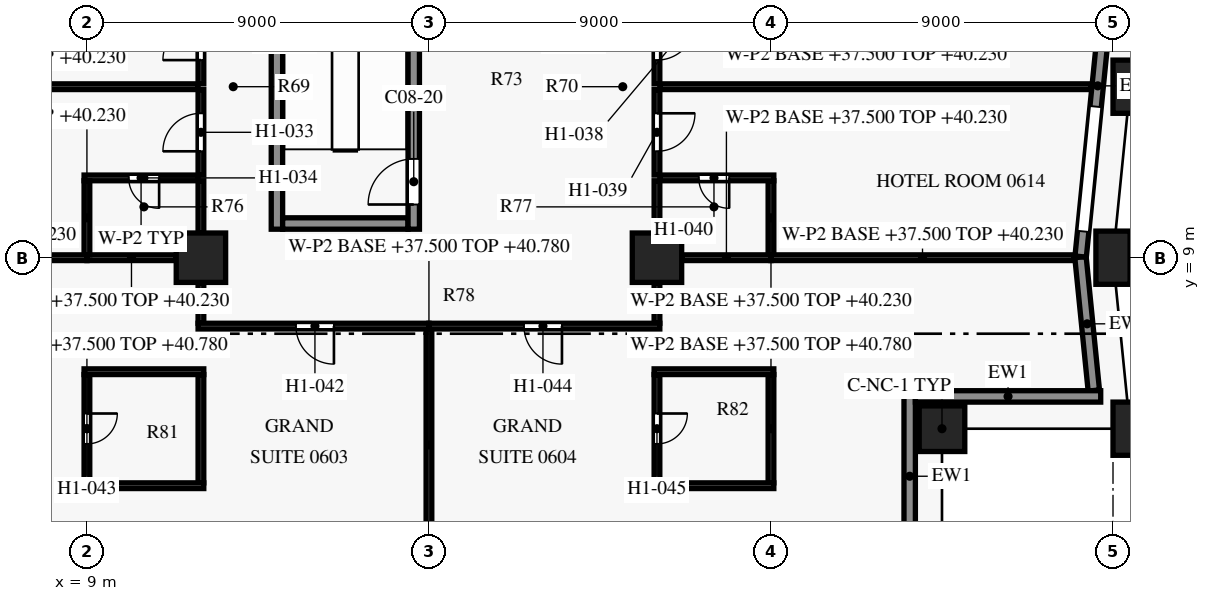
"""IFC4 building model, lengths in metres.
Left out: names, types, materials, properties, quantities, classifications, styles, units other than length and angle.
Written with IfcOpenShell. Run it as: python <this file> out.ifc"""

import sys

from ifc_helpers import new_model, si_unit, direction, frame, frame_2d, origin, origin_2d, place, context, subcontext, project, spatial, rectangle, extrude, element, fill, save


model = new_model("IFC4")
c1 = context("Model", 3, precision=1e-05, world=origin(), true_north=direction((0.0, 1.0)))
c2 = subcontext(c1, "Body", "Model", "MODEL_VIEW")
j1 = project(units=[si_unit("LENGTHUNIT", "METRE"), si_unit("PLANEANGLEUNIT", "RADIAN")], contexts=[c1])
p1 = place(None, origin())
s1 = spatial("IfcSite", under=j1, at=p1, CompositionType="ELEMENT")
p2 = place(p1, origin())
s2 = spatial("IfcBuilding", under=s1, at=p2, CompositionType="ELEMENT")
p3 = place(p2, frame((0.0, 0.0, 37.5)))
s3 = spatial("IfcBuildingStorey", under=s2, at=p3, CompositionType="ELEMENT", Elevation=37.5)
for number, where, z_axis, x_axis in (
    (1, (36.45, 4.5, 0.0), (0.0, 0.0, 1.0), (-0.1, 0.995, 0.0)),
    (2, (36.0, 9.0, 0.0), (0.0, 0.0, 1.0), (0.0, 1.0, 0.0)),
    (3, (36.45, 13.5, 0.0), (0.0, 0.0, 1.0), (0.1, 0.995, 0.0)),
):
    element("IfcColumn", number, at=place(p3, frame(where, z_axis=z_axis, x_axis=x_axis)), inside=s3, PredefinedType="COLUMN", context=c2, shape_type="SweptSolid", body=[
        extrude(rectangle(XDim=0.9, YDim=1.4, at=origin_2d()), origin(), (0.0, 0.0, 1.0), 3.6),
    ])
p4 = place(p3, frame((31.5, 4.5, 0.0), z_axis=(0.0, 0.0, 1.0), x_axis=(1.0, 0.0, 0.0)))
e4 = element("IfcColumn", 4, at=p4, inside=s3, PredefinedType="COLUMN", context=c2, shape_type="SweptSolid", body=[
    extrude(rectangle(XDim=1.2, YDim=1.2, at=origin_2d()), origin(), (0.0, 0.0, 1.0), 3.6),
])
for number, where, z_axis, x_axis in (
    (5, (12.0, 9.0, 0.0), (0.0, 0.0, 1.0), (1.0, 0.0, 0.0)),
    (6, (24.0, 9.0, 0.0), (0.0, 0.0, 1.0), (1.0, 0.0, 0.0)),
):
    element("IfcColumn", number, at=place(p3, frame(where, z_axis=z_axis, x_axis=x_axis)), inside=s3, PredefinedType="COLUMN", context=c2, shape_type="SweptSolid", body=[
        extrude(rectangle(XDim=1.3, YDim=1.3, at=origin_2d()), origin(), (0.0, 0.0, 1.0), 3.6),
    ])
p5 = place(p3, frame((30.65, 5.5, 0.0), z_axis=(0.0, 0.0, 1.0), x_axis=(0.0, -1.0, 0.0)))
e7 = element("IfcWall", 7, at=p5, inside=s3, PredefinedType="SOLIDWALL", context=c2, shape_type="SweptSolid", body=[
    extrude(rectangle(XDim=4.502, YDim=0.3, at=frame_2d((2.251, 0.0))), origin(), (0.0, 0.0, 1.0), 2.95),
])
p6 = place(p3, frame((35.677, 5.35, 0.0), z_axis=(0.0, 0.0, 1.0), x_axis=(-1.0, 0.0, 0.0)))
e8 = element("IfcWall", 8, at=p6, inside=s3, PredefinedType="SOLIDWALL", context=c2, shape_type="SweptSolid", body=[
    extrude(rectangle(XDim=4.876, YDim=0.3, at=frame_2d((2.438, 0.0))), origin(), (0.0, 0.0, 1.0), 2.95),
])
p7 = place(p3, frame((35.144, 9.015, 0.0), z_axis=(0.0, 0.0, 1.0), x_axis=(0.099462600847, -0.995041301169, 0.0)))
e9 = element("IfcWall", 9, at=p7, inside=s3, PredefinedType="SOLIDWALL", context=c2, shape_type="SweptSolid", body=[
    extrude(rectangle(XDim=3.527, YDim=0.3, at=frame_2d((1.764, 0.0))), origin(), (0.0, 0.0, 1.0), 2.95),
])
p8 = place(p3, frame((36.047, 18.015, 0.0), z_axis=(0.0, 0.0, 1.0), x_axis=(-0.099522457379, -0.995035316196, 0.0)))
e10 = element("IfcWall", 10, at=p8, inside=s3, PredefinedType="SOLIDWALL", context=c2, shape_type="SweptSolid", body=[
    extrude(rectangle(XDim=9.03, YDim=0.3, at=frame_2d((4.515, 0.0))), origin(), (0.0, 0.0, 1.0), 2.95),
])
p9 = place(p8, frame((1.291, 0.0, 0.75)))
e11 = element("IfcOpeningElement", 11, at=p9, cuts=e10, PredefinedType="OPENING", context=c2, shape_type="SweptSolid", body=[
    extrude(rectangle(XDim=1.8, YDim=1.8, at=frame_2d((0.9, 0.9))), frame((0.0, 0.16, 0.0), z_axis=(0.0, -1.0, 0.0), x_axis=(1.0, 0.0, 0.0)), (0.0, 0.0, 1.0), 0.32),
])
p10 = place(p8, frame((5.064, 0.0, 0.15)))
e12 = element("IfcOpeningElement", 12, at=p10, cuts=e10, PredefinedType="OPENING", context=c2, shape_type="SweptSolid", body=[
    extrude(rectangle(XDim=3.3, YDim=2.4, at=frame_2d((1.65, 1.2))), frame((0.0, 0.16, 0.0), z_axis=(0.0, -1.0, 0.0), x_axis=(1.0, 0.0, 0.0)), (0.0, 0.0, 1.0), 0.32),
])
p11 = place(p3, frame((14.15, 9.9, 0.0), z_axis=(0.0, 0.0, 1.0), x_axis=(1.0, 0.0, 0.0)))
e13 = element("IfcWall", 13, at=p11, inside=s3, PredefinedType="SHEAR", context=c2, shape_type="SweptSolid", body=[
    extrude(rectangle(XDim=3.3, YDim=0.3, at=frame_2d((1.65, 0.0))), origin(), (0.0, 0.0, 1.0), 3.3),
])
p12 = place(p3, frame((14.0, 9.75, 0.0), z_axis=(0.0, 0.0, 1.0), x_axis=(0.0, 1.0, 0.0)))
e14 = element("IfcWall", 14, at=p12, inside=s3, PredefinedType="SHEAR", context=c2, shape_type="SweptSolid", body=[
    extrude(rectangle(XDim=8.3, YDim=0.3, at=frame_2d((4.15, 0.0))), origin(), (0.0, 0.0, 1.0), 3.3),
])
p13 = place(p3, frame((17.6, 9.75, 0.0), z_axis=(0.0, 0.0, 1.0), x_axis=(0.0, 1.0, 0.0)))
e15 = element("IfcWall", 15, at=p13, inside=s3, PredefinedType="SHEAR", context=c2, shape_type="SweptSolid", body=[
    extrude(rectangle(XDim=8.3, YDim=0.3, at=frame_2d((4.15, 0.0))), origin(), (0.0, 0.0, 1.0), 3.3),
])
p14 = place(p13, frame((0.65, 0.0, 0.0)))
e16 = element("IfcOpeningElement", 16, at=p14, cuts=e15, PredefinedType="OPENING", context=c2, shape_type="SweptSolid", body=[
    extrude(rectangle(XDim=1.2, YDim=2.2, at=frame_2d((0.6, 1.1))), frame((0.0, 0.16, 0.0), z_axis=(0.0, -1.0, 0.0), x_axis=(1.0, 0.0, 0.0)), (0.0, 0.0, 1.0), 0.32),
])
for number, where, z_axis, x_axis in (
    (17, (8.925, 3.0, 0.0), (0.0, 0.0, 1.0), (1.0, 0.0, 0.0)),
    (18, (23.925, 3.0, 0.0), (0.0, 0.0, 1.0), (1.0, 0.0, 0.0)),
):
    element("IfcWall", number, at=place(p3, frame(where, z_axis=z_axis, x_axis=x_axis)), inside=s3, PredefinedType="PARTITIONING", context=c2, shape_type="SweptSolid", body=[
        extrude(rectangle(XDim=3.15, YDim=0.15, at=frame_2d((1.575, 0.0))), origin(), (0.0, 0.0, 1.0), 2.58),
    ])
p15 = place(p3, frame((12.0, 3.075, 0.0), z_axis=(0.0, 0.0, 1.0), x_axis=(0.0, 1.0, 0.0)))
e19 = element("IfcWall", 19, at=p15, inside=s3, PredefinedType="PARTITIONING", context=c2, shape_type="SweptSolid", body=[
    extrude(rectangle(XDim=2.85, YDim=0.15, at=frame_2d((1.425, 0.0))), origin(), (0.0, 0.0, 1.0), 2.58),
])
p16 = place(p3, frame((27.0, 3.075, 0.0), z_axis=(0.0, 0.0, 1.0), x_axis=(0.0, 1.0, 0.0)))
e20 = element("IfcWall", 20, at=p16, inside=s3, PredefinedType="PARTITIONING", context=c2, shape_type="SweptSolid", body=[
    extrude(rectangle(XDim=2.85, YDim=0.15, at=frame_2d((1.425, 0.0))), origin(), (0.0, 0.0, 1.0), 3.28),
])
p17 = place(p3, frame((9.0, 5.925, 0.0), z_axis=(0.0, 0.0, 1.0), x_axis=(0.0, -1.0, 0.0)))
e21 = element("IfcWall", 21, at=p17, inside=s3, PredefinedType="PARTITIONING", context=c2, shape_type="SweptSolid", body=[
    extrude(rectangle(XDim=2.85, YDim=0.15, at=frame_2d((1.425, 0.0))), origin(), (0.0, 0.0, 1.0), 3.28),
])
p18 = place(p17, frame((1.025, 0.0, 0.0)))
e22 = element("IfcOpeningElement", 22, at=p18, cuts=e21, PredefinedType="OPENING", context=c2, shape_type="SweptSolid", body=[
    extrude(rectangle(XDim=0.8, YDim=2.1, at=frame_2d((0.4, 1.05))), frame((0.0, 0.085, 0.0), z_axis=(0.0, -1.0, 0.0), x_axis=(1.0, 0.0, 0.0)), (0.0, 0.0, 1.0), 0.17),
])
p19 = place(p3, frame((24.0, 5.925, 0.0), z_axis=(0.0, 0.0, 1.0), x_axis=(0.0, -1.0, 0.0)))
e23 = element("IfcWall", 23, at=p19, inside=s3, PredefinedType="PARTITIONING", context=c2, shape_type="SweptSolid", body=[
    extrude(rectangle(XDim=2.85, YDim=0.15, at=frame_2d((1.425, 0.0))), origin(), (0.0, 0.0, 1.0), 2.58),
])
p20 = place(p19, frame((1.025, 0.0, 0.0)))
e24 = element("IfcOpeningElement", 24, at=p20, cuts=e23, PredefinedType="OPENING", context=c2, shape_type="SweptSolid", body=[
    extrude(rectangle(XDim=0.8, YDim=2.1, at=frame_2d((0.4, 1.05))), frame((0.0, 0.085, 0.0), z_axis=(0.0, -1.0, 0.0), x_axis=(1.0, 0.0, 0.0)), (0.0, 0.0, 1.0), 0.17),
])
for number, where, z_axis, x_axis in (
    (25, (12.075, 6.0, 0.0), (0.0, 0.0, 1.0), (-1.0, 0.0, 0.0)),
    (26, (27.075, 6.0, 0.0), (0.0, 0.0, 1.0), (-1.0, 0.0, 0.0)),
):
    element("IfcWall", number, at=place(p3, frame(where, z_axis=z_axis, x_axis=x_axis)), inside=s3, PredefinedType="PARTITIONING", context=c2, shape_type="SweptSolid", body=[
        extrude(rectangle(XDim=3.15, YDim=0.15, at=frame_2d((1.575, 0.0))), origin(), (0.0, 0.0, 1.0), 2.58),
    ])
p21 = place(p3, frame((18.0, 7.125, 0.0), z_axis=(0.0, 0.0, 1.0), x_axis=(0.0, -1.0, 0.0)))
e27 = element("IfcWall", 27, at=p21, inside=s3, PredefinedType="PARTITIONING", context=c2, shape_type="SweptSolid", body=[
    extrude(rectangle(XDim=6.105, YDim=0.15, at=frame_2d((3.052, 0.0))), origin(), (0.0, 0.0, 1.0), 3.28),
])
p22 = place(p3, frame((18.0, 7.2, 0.0), z_axis=(0.0, 0.0, 1.0), x_axis=(-1.0, 0.0, 0.0)))
e28 = element("IfcWall", 28, at=p22, inside=s3, PredefinedType="PARTITIONING", context=c2, shape_type="SweptSolid", body=[
    extrude(rectangle(XDim=6.075, YDim=0.15, at=frame_2d((3.038, 0.0))), origin(), (0.0, 0.0, 1.0), 2.58),
])
p23 = place(p22, frame((2.5, 0.0, 0.0)))
e29 = element("IfcOpeningElement", 29, at=p23, cuts=e28, PredefinedType="OPENING", context=c2, shape_type="SweptSolid", body=[
    extrude(rectangle(XDim=1.0, YDim=2.1, at=frame_2d((0.5, 1.05))), frame((0.0, 0.085, 0.0), z_axis=(0.0, -1.0, 0.0), x_axis=(1.0, 0.0, 0.0)), (0.0, 0.0, 1.0), 0.17),
])
p24 = place(p3, frame((24.075, 7.2, 0.0), z_axis=(0.0, 0.0, 1.0), x_axis=(-1.0, 0.0, 0.0)))
e30 = element("IfcWall", 30, at=p24, inside=s3, PredefinedType="PARTITIONING", context=c2, shape_type="SweptSolid", body=[
    extrude(rectangle(XDim=6.075, YDim=0.15, at=frame_2d((3.038, 0.0))), origin(), (0.0, 0.0, 1.0), 2.58),
])
p25 = place(p24, frame((2.575, 0.0, 0.0)))
e31 = element("IfcOpeningElement", 31, at=p25, cuts=e30, PredefinedType="OPENING", context=c2, shape_type="SweptSolid", body=[
    extrude(rectangle(XDim=1.0, YDim=2.1, at=frame_2d((0.5, 1.05))), frame((0.0, 0.085, 0.0), z_axis=(0.0, -1.0, 0.0), x_axis=(1.0, 0.0, 0.0)), (0.0, 0.0, 1.0), 0.17),
])
for number, where, z_axis, x_axis in (
    (32, (12.0, 7.275, 0.0), (0.0, 0.0, 1.0), (0.0, 1.0, 0.0)),
    (33, (24.0, 8.345, 0.0), (0.0, 0.0, 1.0), (0.0, -1.0, 0.0)),
):
    element("IfcWall", number, at=place(p3, frame(where, z_axis=z_axis, x_axis=x_axis)), inside=s3, PredefinedType="PARTITIONING", context=c2, shape_type="SweptSolid", body=[
        extrude(rectangle(XDim=1.07, YDim=0.15, at=frame_2d((0.535, 0.0))), origin(), (0.0, 0.0, 1.0), 2.58),
    ])
p26 = place(p3, frame((9.0, 9.0, 0.0), z_axis=(0.0, 0.0, 1.0), x_axis=(-1.0, 0.0, 0.0)))
e34 = element("IfcWall", 34, at=p26, inside=s3, PredefinedType="PARTITIONING", context=c2, shape_type="SweptSolid", body=[
    extrude(rectangle(XDim=7.975, YDim=0.15, at=frame_2d((3.988, 0.0))), origin(), (0.0, 0.0, 1.0), 2.73),
])
for number, where, z_axis, x_axis in (
    (35, (11.345, 9.0, 0.0), (0.0, 0.0, 1.0), (-1.0, 0.0, 0.0)),
    (36, (27.0, 9.0, 0.0), (0.0, 0.0, 1.0), (-1.0, 0.0, 0.0)),
):
    element("IfcWall", number, at=place(p3, frame(where, z_axis=z_axis, x_axis=x_axis)), inside=s3, PredefinedType="PARTITIONING", context=c2, shape_type="SweptSolid", body=[
        extrude(rectangle(XDim=2.345, YDim=0.15, at=frame_2d((1.172, 0.0))), origin(), (0.0, 0.0, 1.0), 2.73),
    ])
p27 = place(p3, frame((34.975, 9.0, 0.0), z_axis=(0.0, 0.0, 1.0), x_axis=(-1.0, 0.0, 0.0)))
e37 = element("IfcWall", 37, at=p27, inside=s3, PredefinedType="PARTITIONING", context=c2, shape_type="SweptSolid", body=[
    extrude(rectangle(XDim=7.975, YDim=0.15, at=frame_2d((3.988, 0.0))), origin(), (0.0, 0.0, 1.0), 2.73),
])
p28 = place(p3, frame((27.0, 9.075, 0.0), z_axis=(0.0, 0.0, 1.0), x_axis=(0.0, 1.0, 0.0)))
e38 = element("IfcWall", 38, at=p28, inside=s3, PredefinedType="PARTITIONING", context=c2, shape_type="SweptSolid", body=[
    extrude(rectangle(XDim=1.95, YDim=0.15, at=frame_2d((0.975, 0.0))), origin(), (0.0, 0.0, 1.0), 2.73),
])
p29 = place(p3, frame((12.0, 9.655, 0.0), z_axis=(0.0, 0.0, 1.0), x_axis=(0.0, 1.0, 0.0)))
e39 = element("IfcWall", 39, at=p29, inside=s3, PredefinedType="PARTITIONING", context=c2, shape_type="SweptSolid", body=[
    extrude(rectangle(XDim=1.37, YDim=0.15, at=frame_2d((0.685, 0.0))), origin(), (0.0, 0.0, 1.0), 2.58),
])
p30 = place(p3, frame((9.0, 11.025, 0.0), z_axis=(0.0, 0.0, 1.0), x_axis=(0.0, -1.0, 0.0)))
e40 = element("IfcWall", 40, at=p30, inside=s3, PredefinedType="PARTITIONING", context=c2, shape_type="SweptSolid", body=[
    extrude(rectangle(XDim=1.95, YDim=0.15, at=frame_2d((0.975, 0.0))), origin(), (0.0, 0.0, 1.0), 2.73),
])
p31 = place(p3, frame((24.0, 11.025, 0.0), z_axis=(0.0, 0.0, 1.0), x_axis=(0.0, -1.0, 0.0)))
e41 = element("IfcWall", 41, at=p31, inside=s3, PredefinedType="PARTITIONING", context=c2, shape_type="SweptSolid", body=[
    extrude(rectangle(XDim=1.37, YDim=0.15, at=frame_2d((0.685, 0.0))), origin(), (0.0, 0.0, 1.0), 2.58),
])
p32 = place(p3, frame((11.925, 11.1, 0.0), z_axis=(0.0, 0.0, 1.0), x_axis=(-1.0, 0.0, 0.0)))
e42 = element("IfcWall", 42, at=p32, inside=s3, PredefinedType="PARTITIONING", context=c2, shape_type="SweptSolid", body=[
    extrude(rectangle(XDim=3.0, YDim=0.15, at=frame_2d((1.5, 0.0))), origin(), (0.0, 0.0, 1.0), 2.58),
])
p33 = place(p32, frame((1.025, 0.0, 0.0)))
e43 = element("IfcOpeningElement", 43, at=p33, cuts=e42, PredefinedType="OPENING", context=c2, shape_type="SweptSolid", body=[
    extrude(rectangle(XDim=0.8, YDim=2.1, at=frame_2d((0.4, 1.05))), frame((0.0, 0.085, 0.0), z_axis=(0.0, -1.0, 0.0), x_axis=(1.0, 0.0, 0.0)), (0.0, 0.0, 1.0), 0.17),
])
p34 = place(p3, frame((27.075, 11.1, 0.0), z_axis=(0.0, 0.0, 1.0), x_axis=(-1.0, 0.0, 0.0)))
e44 = element("IfcWall", 44, at=p34, inside=s3, PredefinedType="PARTITIONING", context=c2, shape_type="SweptSolid", body=[
    extrude(rectangle(XDim=3.0, YDim=0.15, at=frame_2d((1.5, 0.0))), origin(), (0.0, 0.0, 1.0), 2.58),
])
p35 = place(p34, frame((1.175, 0.0, 0.0)))
e45 = element("IfcOpeningElement", 45, at=p35, cuts=e44, PredefinedType="OPENING", context=c2, shape_type="SweptSolid", body=[
    extrude(rectangle(XDim=0.8, YDim=2.1, at=frame_2d((0.4, 1.05))), frame((0.0, 0.085, 0.0), z_axis=(0.0, -1.0, 0.0), x_axis=(1.0, 0.0, 0.0)), (0.0, 0.0, 1.0), 0.17),
])
p36 = place(p3, frame((12.0, 11.175, 0.0), z_axis=(0.0, 0.0, 1.0), x_axis=(0.0, 1.0, 0.0)))
e46 = element("IfcWall", 46, at=p36, inside=s3, PredefinedType="PARTITIONING", context=c2, shape_type="SweptSolid", body=[
    extrude(rectangle(XDim=2.25, YDim=0.15, at=frame_2d((1.125, 0.0))), origin(), (0.0, 0.0, 1.0), 2.58),
])
p37 = place(p36, frame((0.625, 0.0, 0.0)))
e47 = element("IfcOpeningElement", 47, at=p37, cuts=e46, PredefinedType="OPENING", context=c2, shape_type="SweptSolid", body=[
    extrude(rectangle(XDim=1.0, YDim=2.1, at=frame_2d((0.5, 1.05))), frame((0.0, 0.085, 0.0), z_axis=(0.0, -1.0, 0.0), x_axis=(1.0, 0.0, 0.0)), (0.0, 0.0, 1.0), 0.17),
])
p38 = place(p3, frame((24.0, 13.425, 0.0), z_axis=(0.0, 0.0, 1.0), x_axis=(0.0, -1.0, 0.0)))
e48 = element("IfcWall", 48, at=p38, inside=s3, PredefinedType="PARTITIONING", context=c2, shape_type="SweptSolid", body=[
    extrude(rectangle(XDim=2.25, YDim=0.15, at=frame_2d((1.125, 0.0))), origin(), (0.0, 0.0, 1.0), 2.58),
])
p39 = place(p38, frame((0.625, 0.0, 0.0)))
e49 = element("IfcOpeningElement", 49, at=p39, cuts=e48, PredefinedType="OPENING", context=c2, shape_type="SweptSolid", body=[
    extrude(rectangle(XDim=1.0, YDim=2.1, at=frame_2d((0.5, 1.05))), frame((0.0, 0.085, 0.0), z_axis=(0.0, -1.0, 0.0), x_axis=(1.0, 0.0, 0.0)), (0.0, 0.0, 1.0), 0.17),
])
for number, where, z_axis, x_axis in (
    (50, (11.925, 13.5, 0.0), (0.0, 0.0, 1.0), (-1.0, 0.0, 0.0)),
    (51, (35.425, 13.5, 0.0), (0.0, 0.0, 1.0), (-1.0, 0.0, 0.0)),
):
    element("IfcWall", number, at=place(p3, frame(where, z_axis=z_axis, x_axis=x_axis)), inside=s3, PredefinedType="PARTITIONING", context=c2, shape_type="SweptSolid", body=[
        extrude(rectangle(XDim=11.35, YDim=0.15, at=frame_2d((5.675, 0.0))), origin(), (0.0, 0.0, 1.0), 2.58),
    ])
p40 = place(p3, frame((12.0, 13.575, 0.0), z_axis=(0.0, 0.0, 1.0), x_axis=(0.0, 1.0, 0.0)))
e52 = element("IfcWall", 52, at=p40, inside=s3, PredefinedType="PARTITIONING", context=c2, shape_type="SweptSolid", body=[
    extrude(rectangle(XDim=2.25, YDim=0.15, at=frame_2d((1.125, 0.0))), origin(), (0.0, 0.0, 1.0), 2.58),
])
p41 = place(p40, frame((0.625, 0.0, 0.0)))
e53 = element("IfcOpeningElement", 53, at=p41, cuts=e52, PredefinedType="OPENING", context=c2, shape_type="SweptSolid", body=[
    extrude(rectangle(XDim=1.0, YDim=2.1, at=frame_2d((0.5, 1.05))), frame((0.0, 0.085, 0.0), z_axis=(0.0, -1.0, 0.0), x_axis=(1.0, 0.0, 0.0)), (0.0, 0.0, 1.0), 0.17),
])
p42 = place(p3, frame((24.0, 15.825, 0.0), z_axis=(0.0, 0.0, 1.0), x_axis=(0.0, -1.0, 0.0)))
e54 = element("IfcWall", 54, at=p42, inside=s3, PredefinedType="PARTITIONING", context=c2, shape_type="SweptSolid", body=[
    extrude(rectangle(XDim=2.25, YDim=0.15, at=frame_2d((1.125, 0.0))), origin(), (0.0, 0.0, 1.0), 2.58),
])
p43 = place(p42, frame((0.625, 0.0, 0.0)))
e55 = element("IfcOpeningElement", 55, at=p43, cuts=e54, PredefinedType="OPENING", context=c2, shape_type="SweptSolid", body=[
    extrude(rectangle(XDim=1.0, YDim=2.1, at=frame_2d((0.5, 1.05))), frame((0.0, 0.085, 0.0), z_axis=(0.0, -1.0, 0.0), x_axis=(1.0, 0.0, 0.0)), (0.0, 0.0, 1.0), 0.17),
])
p44 = place(p10, origin())
e56 = element("IfcWindow", 56, at=p44, inside=s3, PartitioningType="SINGLE_PANEL", PredefinedType="WINDOW", context=c2, shape_type="SweptSolid", body=[
    extrude(rectangle(XDim=3.3, YDim=2.4, at=frame_2d((1.65, 1.2))), frame((0.0, 0.03, 0.0), z_axis=(0.0, -1.0, 0.0), x_axis=(1.0, 0.0, 0.0)), (0.0, 0.0, 1.0), 0.06),
])
fill(e12, e56)
p45 = place(p14, origin())
e57 = element("IfcDoor", 57, at=p45, inside=s3, OperationType="SINGLE_SWING_LEFT", PredefinedType="DOOR", context=c2, shape_type="SweptSolid", body=[
    extrude(rectangle(XDim=1.2, YDim=2.2, at=frame_2d((0.6, 1.1))), frame((0.0, 0.025, 0.0), z_axis=(0.0, -1.0, 0.0), x_axis=(1.0, 0.0, 0.0)), (0.0, 0.0, 1.0), 0.05),
])
fill(e16, e57)
p46 = place(p41, origin())
e58 = element("IfcDoor", 58, at=p46, inside=s3, OperationType="SINGLE_SWING_LEFT", PredefinedType="DOOR", context=c2, shape_type="SweptSolid", body=[
    extrude(rectangle(XDim=1.0, YDim=2.1, at=frame_2d((0.5, 1.05))), frame((0.0, 0.025, 0.0), z_axis=(0.0, -1.0, 0.0), x_axis=(1.0, 0.0, 0.0)), (0.0, 0.0, 1.0), 0.05),
])
fill(e53, e58)
p47 = place(p37, origin())
e59 = element("IfcDoor", 59, at=p47, inside=s3, OperationType="SINGLE_SWING_LEFT", PredefinedType="DOOR", context=c2, shape_type="SweptSolid", body=[
    extrude(rectangle(XDim=1.0, YDim=2.1, at=frame_2d((0.5, 1.05))), frame((0.0, 0.025, 0.0), z_axis=(0.0, -1.0, 0.0), x_axis=(1.0, 0.0, 0.0)), (0.0, 0.0, 1.0), 0.05),
])
fill(e47, e59)
p48 = place(p33, origin())
e60 = element("IfcDoor", 60, at=p48, inside=s3, OperationType="SINGLE_SWING_LEFT", PredefinedType="DOOR", context=c2, shape_type="SweptSolid", body=[
    extrude(rectangle(XDim=0.8, YDim=2.1, at=frame_2d((0.4, 1.05))), frame((0.0, 0.025, 0.0), z_axis=(0.0, -1.0, 0.0), x_axis=(1.0, 0.0, 0.0)), (0.0, 0.0, 1.0), 0.05),
])
fill(e43, e60)
p49 = place(p43, origin())
e61 = element("IfcDoor", 61, at=p49, inside=s3, OperationType="SINGLE_SWING_LEFT", PredefinedType="DOOR", context=c2, shape_type="SweptSolid", body=[
    extrude(rectangle(XDim=1.0, YDim=2.1, at=frame_2d((0.5, 1.05))), frame((0.0, 0.025, 0.0), z_axis=(0.0, -1.0, 0.0), x_axis=(1.0, 0.0, 0.0)), (0.0, 0.0, 1.0), 0.05),
])
fill(e55, e61)
p50 = place(p39, origin())
e62 = element("IfcDoor", 62, at=p50, inside=s3, OperationType="SINGLE_SWING_LEFT", PredefinedType="DOOR", context=c2, shape_type="SweptSolid", body=[
    extrude(rectangle(XDim=1.0, YDim=2.1, at=frame_2d((0.5, 1.05))), frame((0.0, 0.025, 0.0), z_axis=(0.0, -1.0, 0.0), x_axis=(1.0, 0.0, 0.0)), (0.0, 0.0, 1.0), 0.05),
])
fill(e49, e62)
p51 = place(p35, origin())
e63 = element("IfcDoor", 63, at=p51, inside=s3, OperationType="SINGLE_SWING_LEFT", PredefinedType="DOOR", context=c2, shape_type="SweptSolid", body=[
    extrude(rectangle(XDim=0.8, YDim=2.1, at=frame_2d((0.4, 1.05))), frame((0.0, 0.025, 0.0), z_axis=(0.0, -1.0, 0.0), x_axis=(1.0, 0.0, 0.0)), (0.0, 0.0, 1.0), 0.05),
])
fill(e45, e63)
p52 = place(p23, origin())
e64 = element("IfcDoor", 64, at=p52, inside=s3, OperationType="SINGLE_SWING_LEFT", PredefinedType="DOOR", context=c2, shape_type="SweptSolid", body=[
    extrude(rectangle(XDim=1.0, YDim=2.1, at=frame_2d((0.5, 1.05))), frame((0.0, 0.025, 0.0), z_axis=(0.0, -1.0, 0.0), x_axis=(1.0, 0.0, 0.0)), (0.0, 0.0, 1.0), 0.05),
])
fill(e29, e64)
p53 = place(p18, origin())
e65 = element("IfcDoor", 65, at=p53, inside=s3, OperationType="SINGLE_SWING_RIGHT", PredefinedType="DOOR", context=c2, shape_type="SweptSolid", body=[
    extrude(rectangle(XDim=0.8, YDim=2.1, at=frame_2d((0.4, 1.05))), frame((0.0, 0.025, 0.0), z_axis=(0.0, -1.0, 0.0), x_axis=(1.0, 0.0, 0.0)), (0.0, 0.0, 1.0), 0.05),
])
fill(e22, e65)
p54 = place(p25, origin())
e66 = element("IfcDoor", 66, at=p54, inside=s3, OperationType="SINGLE_SWING_LEFT", PredefinedType="DOOR", context=c2, shape_type="SweptSolid", body=[
    extrude(rectangle(XDim=1.0, YDim=2.1, at=frame_2d((0.5, 1.05))), frame((0.0, 0.025, 0.0), z_axis=(0.0, -1.0, 0.0), x_axis=(1.0, 0.0, 0.0)), (0.0, 0.0, 1.0), 0.05),
])
fill(e31, e66)
p55 = place(p20, origin())
e67 = element("IfcDoor", 67, at=p55, inside=s3, OperationType="SINGLE_SWING_RIGHT", PredefinedType="DOOR", context=c2, shape_type="SweptSolid", body=[
    extrude(rectangle(XDim=0.8, YDim=2.1, at=frame_2d((0.4, 1.05))), frame((0.0, 0.025, 0.0), z_axis=(0.0, -1.0, 0.0), x_axis=(1.0, 0.0, 0.0)), (0.0, 0.0, 1.0), 0.05),
])
fill(e24, e67)
save(model, sys.argv[1])
